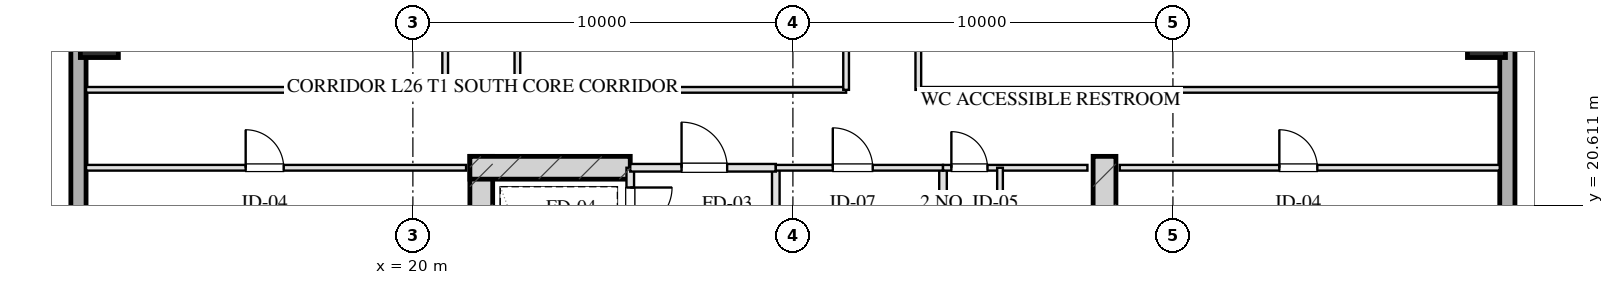
"""IFC4 building model, lengths in metres.
Left out: names, types, materials, properties, quantities, classifications, styles, units other than length and angle.
Written with IfcOpenShell. Run it as: python <this file> out.ifc"""

import sys

from ifc_helpers import new_model, si_unit, direction, frame, frame_2d, origin, origin_2d, place, context, subcontext, project, spatial, rectangle, hollow_rectangle, extrude, element, fill, save


model = new_model("IFC4")
c1 = context("Model", 3, precision=1e-05, world=origin(), true_north=direction((0.0, 1.0)))
c2 = subcontext(c1, "Body", "Model", "MODEL_VIEW")
j1 = project(units=[si_unit("LENGTHUNIT", "METRE"), si_unit("PLANEANGLEUNIT", "RADIAN")], contexts=[c1])
p1 = place(None, origin())
s1 = spatial("IfcSite", under=j1, at=p1, CompositionType="ELEMENT")
p2 = place(p1, origin())
s2 = spatial("IfcBuilding", under=s1, at=p2, CompositionType="ELEMENT")
p3 = place(p2, frame((0.0, 0.0, 103.5)))
s3 = spatial("IfcBuildingStorey", under=s2, at=p3, CompositionType="ELEMENT", Elevation=103.5)
for number, where, z_axis, x_axis in (
    (1, (21.8, 21.9, 0.0), (0.0, 0.0, 1.0), (0.0, -1.0, 0.0)),
    (2, (38.2, 21.9, 0.0), (0.0, 0.0, 1.0), (0.0, -1.0, 0.0)),
):
    element("IfcWall", number, at=place(p3, frame(where, z_axis=z_axis, x_axis=x_axis)), inside=s3, PredefinedType="SHEAR", context=c2, shape_type="SweptSolid", body=[
        extrude(rectangle(XDim=9.48, YDim=0.6, at=frame_2d((4.74, 0.0))), origin(), (0.0, 0.0, 1.0), 3.45),
    ])
p4 = place(p3, frame((21.5, 21.6, 0.0), z_axis=(0.0, 0.0, 1.0), x_axis=(1.0, 0.0, 0.0)))
e3 = element("IfcWall", 3, at=p4, inside=s3, PredefinedType="SHEAR", context=c2, shape_type="SweptSolid", body=[
    extrude(rectangle(XDim=4.22, YDim=0.6, at=frame_2d((2.11, 0.0))), origin(), (0.0, 0.0, 1.0), 3.45),
])
for number, where, z_axis, x_axis in (
    (4, (11.75, 25.0, 0.0), (0.0, 0.0, 1.0), (1.0, 0.0, 0.0)),
    (5, (48.25, 25.0, 0.0), (0.0, 0.0, 1.0), (1.0, 0.0, 0.0)),
):
    element("IfcColumn", number, at=place(p3, frame(where, z_axis=z_axis, x_axis=x_axis)), inside=s3, PredefinedType="COLUMN", context=c2, shape_type="SweptSolid", body=[
        extrude(hollow_rectangle(XDim=1.0, YDim=1.0, WallThickness=0.036, at=origin_2d()), origin(), (0.0, 0.0, 1.0), 3.451),
    ])
p5 = place(p3, frame((11.2, 9.0, 0.0), z_axis=(0.0, 0.0, 1.0), x_axis=(0.0, 1.0, 0.0)))
e6 = element("IfcWall", 6, at=p5, inside=s3, PredefinedType="SOLIDWALL", context=c2, shape_type="SweptSolid", body=[
    extrude(rectangle(XDim=50.0, YDim=0.4, at=frame_2d((25.0, 0.0))), origin(), (0.0, 0.0, 1.0), 2.61),
])
p6 = place(p5, frame((26.4, 0.0, 0.75)))
e7 = element("IfcOpeningElement", 7, at=p6, cuts=e6, PredefinedType="OPENING", context=c2, shape_type="SweptSolid", body=[
    extrude(rectangle(XDim=2.4, YDim=1.46, at=frame_2d((1.2, 0.73))), frame((0.0, 0.21, 0.0), z_axis=(0.0, -1.0, 0.0), x_axis=(1.0, 0.0, 0.0)), (0.0, 0.0, 1.0), 0.42),
])
p7 = place(p5, frame((21.35, 0.0, 0.0)))
e8 = element("IfcOpeningElement", 8, at=p7, cuts=e6, PredefinedType="OPENING", context=c2, shape_type="SweptSolid", body=[
    extrude(rectangle(XDim=1.1, YDim=2.15, at=frame_2d((0.55, 1.075))), frame((0.0, 0.21, 0.0), z_axis=(0.0, -1.0, 0.0), x_axis=(1.0, 0.0, 0.0)), (0.0, 0.0, 1.0), 0.42),
])
p8 = place(p3, frame((48.8, 59.0, 0.0), z_axis=(0.0, 0.0, 1.0), x_axis=(0.0, -1.0, 0.0)))
e9 = element("IfcWall", 9, at=p8, inside=s3, PredefinedType="SOLIDWALL", context=c2, shape_type="SweptSolid", body=[
    extrude(rectangle(XDim=50.0, YDim=0.4, at=frame_2d((25.0, 0.0))), origin(), (0.0, 0.0, 1.0), 2.61),
])
p9 = place(p8, frame((27.55, 0.0, 0.0)))
e10 = element("IfcOpeningElement", 10, at=p9, cuts=e9, PredefinedType="OPENING", context=c2, shape_type="SweptSolid", body=[
    extrude(rectangle(XDim=1.1, YDim=2.15, at=frame_2d((0.55, 1.075))), frame((0.0, 0.21, 0.0), z_axis=(0.0, -1.0, 0.0), x_axis=(1.0, 0.0, 0.0)), (0.0, 0.0, 1.0), 0.42),
])
p10 = place(p3, frame((25.72, 21.6, 0.0), z_axis=(0.0, 0.0, 1.0), x_axis=(0.0, -1.0, 0.0)))
e11 = element("IfcWall", 11, at=p10, inside=s3, PredefinedType="PARTITIONING", context=c2, shape_type="SweptSolid", body=[
    extrude(rectangle(XDim=1.9, YDim=0.2, at=frame_2d((0.95, 0.0))), origin(), (0.0, 0.0, 1.0), 3.175),
])
p11 = place(p10, frame((0.52, 0.0, 0.0)))
e12 = element("IfcOpeningElement", 12, at=p11, cuts=e11, PredefinedType="OPENING", context=c2, shape_type="SweptSolid", body=[
    extrude(rectangle(XDim=1.1, YDim=2.05, at=frame_2d((0.55, 1.025))), frame((0.0, 0.11, 0.0), z_axis=(0.0, -1.0, 0.0), x_axis=(1.0, 0.0, 0.0)), (0.0, 0.0, 1.0), 0.22),
])
p12 = place(p3, frame((29.55, 21.6, 0.0), z_axis=(0.0, 0.0, 1.0), x_axis=(0.0, -1.0, 0.0)))
e13 = element("IfcWall", 13, at=p12, inside=s3, PredefinedType="PARTITIONING", context=c2, shape_type="SweptSolid", body=[
    extrude(rectangle(XDim=8.43, YDim=0.2, at=frame_2d((4.215, 0.0))), origin(), (0.0, 0.0, 1.0), 3.175),
])
p13 = place(p3, frame((25.72, 21.6, 0.0), z_axis=(0.0, 0.0, 1.0), x_axis=(1.0, 0.0, 0.0)))
e14 = element("IfcWall", 14, at=p13, inside=s3, PredefinedType="PARTITIONING", context=c2, shape_type="SweptSolid", body=[
    extrude(rectangle(XDim=3.83, YDim=0.2, at=frame_2d((1.915, 0.0))), origin(), (0.0, 0.0, 1.0), 3.175),
])
p14 = place(p13, frame((1.35, 0.0, 0.0)))
e15 = element("IfcOpeningElement", 15, at=p14, cuts=e14, PredefinedType="OPENING", context=c2, shape_type="SweptSolid", body=[
    extrude(rectangle(XDim=1.2, YDim=2.05, at=frame_2d((0.6, 1.025))), frame((0.0, 0.11, 0.0), z_axis=(0.0, -1.0, 0.0), x_axis=(1.0, 0.0, 0.0)), (0.0, 0.0, 1.0), 0.22),
])
p15 = place(p3, frame((33.95, 21.6, 0.0), z_axis=(0.0, 0.0, 1.0), x_axis=(0.0, -1.0, 0.0)))
e16 = element("IfcWall", 16, at=p15, inside=s3, PredefinedType="PARTITIONING", context=c2, shape_type="SweptSolid", body=[
    extrude(rectangle(XDim=8.43, YDim=0.2, at=frame_2d((4.215, 0.0))), origin(), (0.0, 0.0, 1.0), 3.175),
])
p16 = place(p3, frame((29.55, 21.6, 0.0), z_axis=(0.0, 0.0, 1.0), x_axis=(1.0, 0.0, 0.0)))
e17 = element("IfcWall", 17, at=p16, inside=s3, PredefinedType="PARTITIONING", context=c2, shape_type="SweptSolid", body=[
    extrude(rectangle(XDim=4.4, YDim=0.15, at=frame_2d((2.2, 0.0))), origin(), (0.0, 0.0, 1.0), 3.175),
])
p17 = place(p16, frame((1.5, 0.0, 0.0)))
e18 = element("IfcOpeningElement", 18, at=p17, cuts=e17, PredefinedType="OPENING", context=c2, shape_type="SweptSolid", body=[
    extrude(rectangle(XDim=1.05, YDim=2.05, at=frame_2d((0.525, 1.025))), frame((0.0, 0.085, 0.0), z_axis=(0.0, -1.0, 0.0), x_axis=(1.0, 0.0, 0.0)), (0.0, 0.0, 1.0), 0.17),
])
p18 = place(p3, frame((33.95, 21.6, 0.0), z_axis=(0.0, 0.0, 1.0), x_axis=(1.0, 0.0, 0.0)))
e19 = element("IfcWall", 19, at=p18, inside=s3, PredefinedType="PARTITIONING", context=c2, shape_type="SweptSolid", body=[
    extrude(rectangle(XDim=3.8, YDim=0.15, at=frame_2d((1.9, 0.0))), origin(), (0.0, 0.0, 1.0), 3.175),
])
p19 = place(p18, frame((0.22, 0.0, 0.0)))
e20 = element("IfcOpeningElement", 20, at=p19, cuts=e19, PredefinedType="OPENING", context=c2, shape_type="SweptSolid", body=[
    extrude(rectangle(XDim=0.95, YDim=2.05, at=frame_2d((0.475, 1.025))), frame((0.0, 0.085, 0.0), z_axis=(0.0, -1.0, 0.0), x_axis=(1.0, 0.0, 0.0)), (0.0, 0.0, 1.0), 0.17),
])
p20 = place(p3, frame((35.45, 21.6, 0.0), z_axis=(0.0, 0.0, 1.0), x_axis=(0.0, -1.0, 0.0)))
e21 = element("IfcWall", 21, at=p20, inside=s3, PredefinedType="PARTITIONING", context=c2, shape_type="SweptSolid", body=[
    extrude(rectangle(XDim=8.43, YDim=0.15, at=frame_2d((4.215, 0.0))), origin(), (0.0, 0.0, 1.0), 2.765),
])
p21 = place(p20, frame((2.55, 0.0, 0.0)))
e22 = element("IfcOpeningElement", 22, at=p21, cuts=e21, PredefinedType="OPENING", context=c2, shape_type="SweptSolid", body=[
    extrude(rectangle(XDim=0.95, YDim=2.05, at=frame_2d((0.475, 1.025))), frame((0.0, 0.085, 0.0), z_axis=(0.0, -1.0, 0.0), x_axis=(1.0, 0.0, 0.0)), (0.0, 0.0, 1.0), 0.17),
])
p22 = place(p20, frame((5.8, 0.0, 0.0)))
e23 = element("IfcOpeningElement", 23, at=p22, cuts=e21, PredefinedType="OPENING", context=c2, shape_type="SweptSolid", body=[
    extrude(rectangle(XDim=0.9, YDim=2.05, at=frame_2d((0.45, 1.025))), frame((0.0, 0.085, 0.0), z_axis=(0.0, -1.0, 0.0), x_axis=(1.0, 0.0, 0.0)), (0.0, 0.0, 1.0), 0.17),
])
p23 = place(p3, frame((11.4, 21.6, 0.0), z_axis=(0.0, 0.0, 1.0), x_axis=(1.0, 0.0, 0.0)))
e24 = element("IfcWall", 24, at=p23, inside=s3, PredefinedType="PARTITIONING", context=c2, shape_type="SweptSolid", body=[
    extrude(rectangle(XDim=10.0, YDim=0.15, at=frame_2d((5.0, 0.0))), origin(), (0.0, 0.0, 1.0), 3.175),
])
p24 = place(p23, frame((4.2, 0.0, 0.0)))
e25 = element("IfcOpeningElement", 25, at=p24, cuts=e24, PredefinedType="OPENING", context=c2, shape_type="SweptSolid", body=[
    extrude(rectangle(XDim=1.0, YDim=2.05, at=frame_2d((0.5, 1.025))), frame((0.0, 0.085, 0.0), z_axis=(0.0, -1.0, 0.0), x_axis=(1.0, 0.0, 0.0)), (0.0, 0.0, 1.0), 0.17),
])
p25 = place(p3, frame((38.6, 21.6, 0.0), z_axis=(0.0, 0.0, 1.0), x_axis=(1.0, 0.0, 0.0)))
e26 = element("IfcWall", 26, at=p25, inside=s3, PredefinedType="PARTITIONING", context=c2, shape_type="SweptSolid", body=[
    extrude(rectangle(XDim=10.0, YDim=0.15, at=frame_2d((5.0, 0.0))), origin(), (0.0, 0.0, 1.0), 3.175),
])
p26 = place(p25, frame((4.2, 0.0, 0.0)))
e27 = element("IfcOpeningElement", 27, at=p26, cuts=e26, PredefinedType="OPENING", context=c2, shape_type="SweptSolid", body=[
    extrude(rectangle(XDim=1.0, YDim=2.05, at=frame_2d((0.5, 1.025))), frame((0.0, 0.085, 0.0), z_axis=(0.0, -1.0, 0.0), x_axis=(1.0, 0.0, 0.0)), (0.0, 0.0, 1.0), 0.17),
])
p27 = place(p3, frame((11.4, 23.65, 0.0), z_axis=(0.0, 0.0, 1.0), x_axis=(1.0, 0.0, 0.0)))
e28 = element("IfcWall", 28, at=p27, inside=s3, PredefinedType="PARTITIONING", context=c2, shape_type="SweptSolid", body=[
    extrude(rectangle(XDim=9.45, YDim=0.15, at=frame_2d((4.725, 0.0))), origin(), (0.0, 0.0, 1.0), 3.175),
])
p28 = place(p3, frame((22.75, 23.65, 0.0), z_axis=(0.0, 0.0, 1.0), x_axis=(1.0, 0.0, 0.0)))
e29 = element("IfcWall", 29, at=p28, inside=s3, PredefinedType="PARTITIONING", context=c2, shape_type="SweptSolid", body=[
    extrude(rectangle(XDim=8.65, YDim=0.15, at=frame_2d((4.325, 0.0))), origin(), (0.0, 0.0, 1.0), 3.175),
])
p29 = place(p3, frame((33.3, 23.65, 0.0), z_axis=(0.0, 0.0, 1.0), x_axis=(1.0, 0.0, 0.0)))
e30 = element("IfcWall", 30, at=p29, inside=s3, PredefinedType="PARTITIONING", context=c2, shape_type="SweptSolid", body=[
    extrude(rectangle(XDim=15.3, YDim=0.15, at=frame_2d((7.65, 0.0))), origin(), (0.0, 0.0, 1.0), 3.175),
])
p30 = place(p3, frame((20.85, 23.65, 0.0), z_axis=(0.0, 0.0, 1.0), x_axis=(0.0, 1.0, 0.0)))
e31 = element("IfcWall", 31, at=p30, inside=s3, PredefinedType="PARTITIONING", context=c2, shape_type="SweptSolid", body=[
    extrude(rectangle(XDim=20.7, YDim=0.15, at=frame_2d((10.35, 0.0))), origin(), (0.0, 0.0, 1.0), 3.175),
])
p31 = place(p30, frame((2.175, 0.0, 0.0)))
e32 = element("IfcOpeningElement", 32, at=p31, cuts=e31, PredefinedType="OPENING", context=c2, shape_type="SweptSolid", body=[
    extrude(rectangle(XDim=1.05, YDim=2.05, at=frame_2d((0.525, 1.025))), frame((0.0, 0.085, 0.0), z_axis=(0.0, -1.0, 0.0), x_axis=(1.0, 0.0, 0.0)), (0.0, 0.0, 1.0), 0.17),
])
p32 = place(p30, frame((7.69, 0.0, 0.0)))
e33 = element("IfcOpeningElement", 33, at=p32, cuts=e31, PredefinedType="OPENING", context=c2, shape_type="SweptSolid", body=[
    extrude(rectangle(XDim=1.0, YDim=2.05, at=frame_2d((0.5, 1.025))), frame((0.0, 0.085, 0.0), z_axis=(0.0, -1.0, 0.0), x_axis=(1.0, 0.0, 0.0)), (0.0, 0.0, 1.0), 0.17),
])
p33 = place(p30, frame((12.69, 0.0, 0.0)))
e34 = element("IfcOpeningElement", 34, at=p33, cuts=e31, PredefinedType="OPENING", context=c2, shape_type="SweptSolid", body=[
    extrude(rectangle(XDim=1.0, YDim=2.05, at=frame_2d((0.5, 1.025))), frame((0.0, 0.085, 0.0), z_axis=(0.0, -1.0, 0.0), x_axis=(1.0, 0.0, 0.0)), (0.0, 0.0, 1.0), 0.17),
])
p34 = place(p30, frame((17.525, 0.0, 0.0)))
e35 = element("IfcOpeningElement", 35, at=p34, cuts=e31, PredefinedType="OPENING", context=c2, shape_type="SweptSolid", body=[
    extrude(rectangle(XDim=1.0, YDim=2.05, at=frame_2d((0.5, 1.025))), frame((0.0, 0.085, 0.0), z_axis=(0.0, -1.0, 0.0), x_axis=(1.0, 0.0, 0.0)), (0.0, 0.0, 1.0), 0.17),
])
p35 = place(p3, frame((22.75, 23.65, 0.0), z_axis=(0.0, 0.0, 1.0), x_axis=(0.0, 1.0, 0.0)))
e36 = element("IfcWall", 36, at=p35, inside=s3, PredefinedType="PARTITIONING", context=c2, shape_type="SweptSolid", body=[
    extrude(rectangle(XDim=20.7, YDim=0.15, at=frame_2d((10.35, 0.0))), origin(), (0.0, 0.0, 1.0), 3.175),
])
p36 = place(p35, frame((9.936, 0.0, 0.0)))
e37 = element("IfcOpeningElement", 37, at=p36, cuts=e36, PredefinedType="OPENING", context=c2, shape_type="SweptSolid", body=[
    extrude(rectangle(XDim=1.1, YDim=2.05, at=frame_2d((0.55, 1.025))), frame((0.0, 0.085, 0.0), z_axis=(0.0, -1.0, 0.0), x_axis=(1.0, 0.0, 0.0)), (0.0, 0.0, 1.0), 0.17),
])
p37 = place(p3, frame((31.4, 23.65, 0.0), z_axis=(0.0, 0.0, 1.0), x_axis=(0.0, 1.0, 0.0)))
e38 = element("IfcWall", 38, at=p37, inside=s3, PredefinedType="PARTITIONING", context=c2, shape_type="SweptSolid", body=[
    extrude(rectangle(XDim=20.7, YDim=0.15, at=frame_2d((10.35, 0.0))), origin(), (0.0, 0.0, 1.0), 3.175),
])
p38 = place(p3, frame((33.3, 23.65, 0.0), z_axis=(0.0, 0.0, 1.0), x_axis=(0.0, 1.0, 0.0)))
e39 = element("IfcWall", 39, at=p38, inside=s3, PredefinedType="PARTITIONING", context=c2, shape_type="SweptSolid", body=[
    extrude(rectangle(XDim=20.7, YDim=0.15, at=frame_2d((10.35, 0.0))), origin(), (0.0, 0.0, 1.0), 3.175),
])
p39 = place(p38, frame((2.175, 0.0, 0.0)))
e40 = element("IfcOpeningElement", 40, at=p39, cuts=e39, PredefinedType="OPENING", context=c2, shape_type="SweptSolid", body=[
    extrude(rectangle(XDim=1.0, YDim=2.05, at=frame_2d((0.5, 1.025))), frame((0.0, 0.085, 0.0), z_axis=(0.0, -1.0, 0.0), x_axis=(1.0, 0.0, 0.0)), (0.0, 0.0, 1.0), 0.17),
])
p40 = place(p38, frame((6.75, 0.0, 0.0)))
e41 = element("IfcOpeningElement", 41, at=p40, cuts=e39, PredefinedType="OPENING", context=c2, shape_type="SweptSolid", body=[
    extrude(rectangle(XDim=0.85, YDim=2.05, at=frame_2d((0.425, 1.025))), frame((0.0, 0.085, 0.0), z_axis=(0.0, -1.0, 0.0), x_axis=(1.0, 0.0, 0.0)), (0.0, 0.0, 1.0), 0.17),
])
p41 = place(p38, frame((11.25, 0.0, 0.0)))
e42 = element("IfcOpeningElement", 42, at=p41, cuts=e39, PredefinedType="OPENING", context=c2, shape_type="SweptSolid", body=[
    extrude(rectangle(XDim=1.05, YDim=2.05, at=frame_2d((0.525, 1.025))), frame((0.0, 0.085, 0.0), z_axis=(0.0, -1.0, 0.0), x_axis=(1.0, 0.0, 0.0)), (0.0, 0.0, 1.0), 0.17),
])
p42 = place(p38, frame((15.75, 0.0, 0.0)))
e43 = element("IfcOpeningElement", 43, at=p42, cuts=e39, PredefinedType="OPENING", context=c2, shape_type="SweptSolid", body=[
    extrude(rectangle(XDim=1.0, YDim=2.05, at=frame_2d((0.5, 1.025))), frame((0.0, 0.085, 0.0), z_axis=(0.0, -1.0, 0.0), x_axis=(1.0, 0.0, 0.0)), (0.0, 0.0, 1.0), 0.17),
])
p43 = place(p38, frame((18.925, 0.0, 0.0)))
e44 = element("IfcOpeningElement", 44, at=p43, cuts=e39, PredefinedType="OPENING", context=c2, shape_type="SweptSolid", body=[
    extrude(rectangle(XDim=1.0, YDim=2.05, at=frame_2d((0.5, 1.025))), frame((0.0, 0.085, 0.0), z_axis=(0.0, -1.0, 0.0), x_axis=(1.0, 0.0, 0.0)), (0.0, 0.0, 1.0), 0.17),
])
p44 = place(p11, origin())
e45 = element("IfcDoor", 45, at=p44, inside=s3, OperationType="SINGLE_SWING_LEFT", PredefinedType="DOOR", context=c2, shape_type="SweptSolid", body=[
    extrude(rectangle(XDim=1.1, YDim=2.05, at=frame_2d((0.55, 1.025))), frame((0.0, 0.025, 0.0), z_axis=(0.0, -1.0, 0.0), x_axis=(1.0, 0.0, 0.0)), (0.0, 0.0, 1.0), 0.05),
])
fill(e12, e45)
p45 = place(p14, origin())
e46 = element("IfcDoor", 46, at=p45, inside=s3, OperationType="SINGLE_SWING_LEFT", PredefinedType="DOOR", context=c2, shape_type="SweptSolid", body=[
    extrude(rectangle(XDim=1.2, YDim=2.05, at=frame_2d((0.6, 1.025))), frame((0.0, 0.025, 0.0), z_axis=(0.0, -1.0, 0.0), x_axis=(1.0, 0.0, 0.0)), (0.0, 0.0, 1.0), 0.05),
])
fill(e15, e46)
p46 = place(p17, origin())
e47 = element("IfcDoor", 47, at=p46, inside=s3, OperationType="SINGLE_SWING_LEFT", PredefinedType="DOOR", context=c2, shape_type="SweptSolid", body=[
    extrude(rectangle(XDim=1.05, YDim=2.05, at=frame_2d((0.525, 1.025))), frame((0.0, 0.025, 0.0), z_axis=(0.0, -1.0, 0.0), x_axis=(1.0, 0.0, 0.0)), (0.0, 0.0, 1.0), 0.05),
])
fill(e18, e47)
p47 = place(p19, origin())
e48 = element("IfcDoor", 48, at=p47, inside=s3, OperationType="SINGLE_SWING_LEFT", PredefinedType="DOOR", context=c2, shape_type="SweptSolid", body=[
    extrude(rectangle(XDim=0.95, YDim=2.05, at=frame_2d((0.475, 1.025))), frame((0.0, 0.025, 0.0), z_axis=(0.0, -1.0, 0.0), x_axis=(1.0, 0.0, 0.0)), (0.0, 0.0, 1.0), 0.05),
])
fill(e20, e48)
p48 = place(p24, origin())
e49 = element("IfcDoor", 49, at=p48, inside=s3, OperationType="SINGLE_SWING_LEFT", PredefinedType="DOOR", context=c2, shape_type="SweptSolid", body=[
    extrude(rectangle(XDim=1.0, YDim=2.05, at=frame_2d((0.5, 1.025))), frame((0.0, 0.025, 0.0), z_axis=(0.0, -1.0, 0.0), x_axis=(1.0, 0.0, 0.0)), (0.0, 0.0, 1.0), 0.05),
])
fill(e25, e49)
p49 = place(p26, origin())
e50 = element("IfcDoor", 50, at=p49, inside=s3, OperationType="SINGLE_SWING_LEFT", PredefinedType="DOOR", context=c2, shape_type="SweptSolid", body=[
    extrude(rectangle(XDim=1.0, YDim=2.05, at=frame_2d((0.5, 1.025))), frame((0.0, 0.025, 0.0), z_axis=(0.0, -1.0, 0.0), x_axis=(1.0, 0.0, 0.0)), (0.0, 0.0, 1.0), 0.05),
])
fill(e27, e50)
save(model, sys.argv[1])
